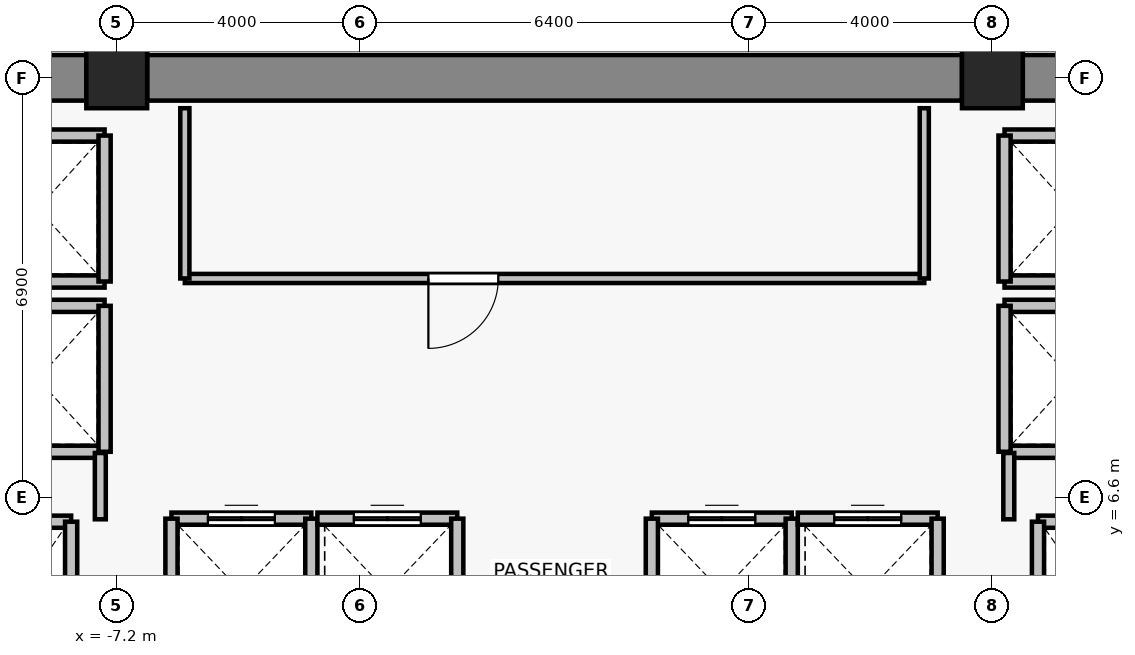
"""IFC4 building model, lengths in metres.
Left out: names, types, materials, properties, quantities, classifications, styles, units other than length and angle.
Written with IfcOpenShell. Run it as: python <this file> out.ifc"""

import sys

from ifc_helpers import new_model, si_unit, direction, frame, frame_2d, origin, origin_2d, place, context, subcontext, project, spatial, rectangle, extrude, source, transform, mapped, element, fill, save


model = new_model("IFC4")
c1 = context("Model", 3, precision=1e-05, world=origin(), true_north=direction((0.0, 1.0)))
c2 = subcontext(c1, "Body", "Model", "MODEL_VIEW")
j1 = project(units=[si_unit("LENGTHUNIT", "METRE"), si_unit("PLANEANGLEUNIT", "RADIAN")], contexts=[c1])
p1 = place(None, origin())
s1 = spatial("IfcSite", under=j1, at=p1, CompositionType="ELEMENT")
p2 = place(p1, origin())
s2 = spatial("IfcBuilding", under=s1, at=p2, CompositionType="ELEMENT")
p3 = place(p2, frame((0.0, 0.0, 149.5)))
s3 = spatial("IfcBuildingStorey", under=s2, at=p3, CompositionType="ELEMENT", Elevation=149.5)
for number, where, z_axis, x_axis in (
    (1, (-7.2, 13.5, 0.0), (0.0, 0.0, 1.0), (1.0, 0.0, 0.0)),
    (2, (7.2, 13.5, 0.0), (0.0, 0.0, 1.0), (1.0, 0.0, 0.0)),
):
    element("IfcColumn", number, at=place(p3, frame(where, z_axis=z_axis, x_axis=x_axis)), inside=s3, PredefinedType="COLUMN", context=c2, shape_type="SweptSolid", body=[
        extrude(rectangle(XDim=1.0, YDim=1.0, at=origin_2d()), origin(), (0.0, 0.0, 1.0), 3.3),
    ])
p4 = place(p3, frame((-13.9, 13.5, 0.0), z_axis=(0.0, 0.0, 1.0), x_axis=(1.0, 0.0, 0.0)))
e3 = element("IfcWall", 3, at=p4, inside=s3, PredefinedType="SHEAR", context=c2, shape_type="SweptSolid", body=[
    extrude(rectangle(XDim=6.2, YDim=0.75, at=frame_2d((3.1, 0.0))), origin(), (0.0, 0.0, 1.0), 3.075),
])
p5 = place(p3, frame((-6.7, 13.5, 0.0), z_axis=(0.0, 0.0, 1.0), x_axis=(1.0, 0.0, 0.0)))
e4 = element("IfcWall", 4, at=p5, inside=s3, PredefinedType="SHEAR", context=c2, shape_type="SweptSolid", body=[
    extrude(rectangle(XDim=13.4, YDim=0.75, at=frame_2d((6.7, 0.0))), origin(), (0.0, 0.0, 1.0), 3.075),
])
p6 = place(p3, frame((7.7, 13.5, 0.0), z_axis=(0.0, 0.0, 1.0), x_axis=(1.0, 0.0, 0.0)))
e5 = element("IfcWall", 5, at=p6, inside=s3, PredefinedType="SHEAR", context=c2, shape_type="SweptSolid", body=[
    extrude(rectangle(XDim=6.2, YDim=0.75, at=frame_2d((3.1, 0.0))), origin(), (0.0, 0.0, 1.0), 3.075),
])
p7 = place(p3, frame((-9.95, 6.2, 0.0), z_axis=(0.0, 0.0, 1.0), x_axis=(1.0, 0.0, 0.0)))
e6 = element("IfcWall", 6, at=p7, inside=s3, PredefinedType="SOLIDWALL", context=c2, shape_type="SweptSolid", body=[
    extrude(rectangle(XDim=2.0, YDim=0.2, at=frame_2d((1.0, 0.0))), origin(), (0.0, 0.0, 1.0), 3.075),
])
p8 = place(p3, frame((-7.95, 6.2, 0.0), z_axis=(0.0, 0.0, 1.0), x_axis=(0.0, -1.0, 0.0)))
e7 = element("IfcWall", 7, at=p8, inside=s3, PredefinedType="SOLIDWALL", context=c2, shape_type="SweptSolid", body=[
    extrude(rectangle(XDim=2.8, YDim=0.2, at=frame_2d((1.4, 0.0))), origin(), (0.0, 0.0, 1.0), 3.075),
])
p9 = place(p3, frame((7.95, 6.2, 0.0), z_axis=(0.0, 0.0, 1.0), x_axis=(1.0, 0.0, 0.0)))
e8 = element("IfcWall", 8, at=p9, inside=s3, PredefinedType="SOLIDWALL", context=c2, shape_type="SweptSolid", body=[
    extrude(rectangle(XDim=2.0, YDim=0.2, at=frame_2d((1.0, 0.0))), origin(), (0.0, 0.0, 1.0), 3.075),
])
p10 = place(p3, frame((7.95, 3.4, 0.0), z_axis=(0.0, 0.0, 1.0), x_axis=(0.0, 1.0, 0.0)))
e9 = element("IfcWall", 9, at=p10, inside=s3, PredefinedType="SOLIDWALL", context=c2, shape_type="SweptSolid", body=[
    extrude(rectangle(XDim=2.8, YDim=0.2, at=frame_2d((1.4, 0.0))), origin(), (0.0, 0.0, 1.0), 3.075),
])
p11 = place(p3, frame((-6.3, 6.25, 0.0), z_axis=(0.0, 0.0, 1.0), x_axis=(1.0, 0.0, 0.0)))
e10 = element("IfcWall", 10, at=p11, inside=s3, PredefinedType="SOLIDWALL", context=c2, shape_type="SweptSolid", body=[
    extrude(rectangle(XDim=2.3, YDim=0.2, at=frame_2d((1.15, 0.0))), origin(), (0.0, 0.0, 1.0), 3.075),
])
p12 = place(p11, frame((0.6, 0.0, 0.0)))
e11 = element("IfcOpeningElement", 11, at=p12, cuts=e10, PredefinedType="OPENING", context=c2, shape_type="SweptSolid", body=[
    extrude(rectangle(XDim=1.1, YDim=2.2, at=frame_2d((0.55, 1.1))), frame((0.0, 0.11, 0.0), z_axis=(0.0, -1.0, 0.0), x_axis=(1.0, 0.0, 0.0)), (0.0, 0.0, 1.0), 0.22),
])
for number, where, z_axis, x_axis in (
    (12, (-6.3, 3.85, 0.0), (0.0, 0.0, 1.0), (0.0, 1.0, 0.0)),
    (13, (-4.0, 6.25, 0.0), (0.0, 0.0, 1.0), (0.0, -1.0, 0.0)),
):
    element("IfcWall", number, at=place(p3, frame(where, z_axis=z_axis, x_axis=x_axis)), inside=s3, PredefinedType="SOLIDWALL", context=c2, shape_type="SweptSolid", body=[
        extrude(rectangle(XDim=2.4, YDim=0.2, at=frame_2d((1.2, 0.0))), origin(), (0.0, 0.0, 1.0), 3.075),
    ])
p13 = place(p3, frame((-3.9, 6.25, 0.0), z_axis=(0.0, 0.0, 1.0), x_axis=(1.0, 0.0, 0.0)))
e14 = element("IfcWall", 14, at=p13, inside=s3, PredefinedType="SOLIDWALL", context=c2, shape_type="SweptSolid", body=[
    extrude(rectangle(XDim=2.3, YDim=0.2, at=frame_2d((1.15, 0.0))), origin(), (0.0, 0.0, 1.0), 3.075),
])
p14 = place(p13, frame((0.6, 0.0, 0.0)))
e15 = element("IfcOpeningElement", 15, at=p14, cuts=e14, PredefinedType="OPENING", context=c2, shape_type="SweptSolid", body=[
    extrude(rectangle(XDim=1.1, YDim=2.2, at=frame_2d((0.55, 1.1))), frame((0.0, 0.11, 0.0), z_axis=(0.0, -1.0, 0.0), x_axis=(1.0, 0.0, 0.0)), (0.0, 0.0, 1.0), 0.22),
])
p15 = place(p3, frame((-1.6, 6.25, 0.0), z_axis=(0.0, 0.0, 1.0), x_axis=(0.0, -1.0, 0.0)))
e16 = element("IfcWall", 16, at=p15, inside=s3, PredefinedType="SOLIDWALL", context=c2, shape_type="SweptSolid", body=[
    extrude(rectangle(XDim=2.4, YDim=0.2, at=frame_2d((1.2, 0.0))), origin(), (0.0, 0.0, 1.0), 3.075),
])
p16 = place(p3, frame((1.6, 6.25, 0.0), z_axis=(0.0, 0.0, 1.0), x_axis=(1.0, 0.0, 0.0)))
e17 = element("IfcWall", 17, at=p16, inside=s3, PredefinedType="SOLIDWALL", context=c2, shape_type="SweptSolid", body=[
    extrude(rectangle(XDim=2.3, YDim=0.2, at=frame_2d((1.15, 0.0))), origin(), (0.0, 0.0, 1.0), 3.075),
])
p17 = place(p16, frame((0.6, 0.0, 0.0)))
e18 = element("IfcOpeningElement", 18, at=p17, cuts=e17, PredefinedType="OPENING", context=c2, shape_type="SweptSolid", body=[
    extrude(rectangle(XDim=1.1, YDim=2.2, at=frame_2d((0.55, 1.1))), frame((0.0, 0.11, 0.0), z_axis=(0.0, -1.0, 0.0), x_axis=(1.0, 0.0, 0.0)), (0.0, 0.0, 1.0), 0.22),
])
for number, where, z_axis, x_axis in (
    (19, (1.6, 3.85, 0.0), (0.0, 0.0, 1.0), (0.0, 1.0, 0.0)),
    (20, (3.9, 6.25, 0.0), (0.0, 0.0, 1.0), (0.0, -1.0, 0.0)),
):
    element("IfcWall", number, at=place(p3, frame(where, z_axis=z_axis, x_axis=x_axis)), inside=s3, PredefinedType="SOLIDWALL", context=c2, shape_type="SweptSolid", body=[
        extrude(rectangle(XDim=2.4, YDim=0.2, at=frame_2d((1.2, 0.0))), origin(), (0.0, 0.0, 1.0), 3.075),
    ])
p18 = place(p3, frame((4.0, 6.25, 0.0), z_axis=(0.0, 0.0, 1.0), x_axis=(1.0, 0.0, 0.0)))
e21 = element("IfcWall", 21, at=p18, inside=s3, PredefinedType="SOLIDWALL", context=c2, shape_type="SweptSolid", body=[
    extrude(rectangle(XDim=2.3, YDim=0.2, at=frame_2d((1.15, 0.0))), origin(), (0.0, 0.0, 1.0), 3.075),
])
p19 = place(p18, frame((0.6, 0.0, 0.0)))
e22 = element("IfcOpeningElement", 22, at=p19, cuts=e21, PredefinedType="OPENING", context=c2, shape_type="SweptSolid", body=[
    extrude(rectangle(XDim=1.1, YDim=2.2, at=frame_2d((0.55, 1.1))), frame((0.0, 0.11, 0.0), z_axis=(0.0, -1.0, 0.0), x_axis=(1.0, 0.0, 0.0)), (0.0, 0.0, 1.0), 0.22),
])
p20 = place(p3, frame((6.3, 6.25, 0.0), z_axis=(0.0, 0.0, 1.0), x_axis=(0.0, -1.0, 0.0)))
e23 = element("IfcWall", 23, at=p20, inside=s3, PredefinedType="SOLIDWALL", context=c2, shape_type="SweptSolid", body=[
    extrude(rectangle(XDim=2.4, YDim=0.2, at=frame_2d((1.2, 0.0))), origin(), (0.0, 0.0, 1.0), 3.075),
])
for number, where, z_axis, x_axis in (
    (24, (-7.4, 7.35, 0.0), (0.0, 0.0, 1.0), (-1.0, 0.0, 0.0)),
    (25, (-9.6, 9.75, 0.0), (0.0, 0.0, 1.0), (1.0, 0.0, 0.0)),
):
    element("IfcWall", number, at=place(p3, frame(where, z_axis=z_axis, x_axis=x_axis)), inside=s3, PredefinedType="SOLIDWALL", context=c2, shape_type="SweptSolid", body=[
        extrude(rectangle(XDim=2.2, YDim=0.2, at=frame_2d((1.1, 0.0))), origin(), (0.0, 0.0, 1.0), 2.565),
    ])
p21 = place(p3, frame((-7.4, 9.75, 0.0), z_axis=(0.0, 0.0, 1.0), x_axis=(0.0, -1.0, 0.0)))
e26 = element("IfcWall", 26, at=p21, inside=s3, PredefinedType="SOLIDWALL", context=c2, shape_type="SweptSolid", body=[
    extrude(rectangle(XDim=2.4, YDim=0.2, at=frame_2d((1.2, 0.0))), origin(), (0.0, 0.0, 1.0), 2.565),
])
for number, where, z_axis, x_axis in (
    (27, (-7.4, 10.15, 0.0), (0.0, 0.0, 1.0), (-1.0, 0.0, 0.0)),
    (28, (-9.6, 12.55, 0.0), (0.0, 0.0, 1.0), (1.0, 0.0, 0.0)),
):
    element("IfcWall", number, at=place(p3, frame(where, z_axis=z_axis, x_axis=x_axis)), inside=s3, PredefinedType="SOLIDWALL", context=c2, shape_type="SweptSolid", body=[
        extrude(rectangle(XDim=2.2, YDim=0.2, at=frame_2d((1.1, 0.0))), origin(), (0.0, 0.0, 1.0), 2.565),
    ])
p22 = place(p3, frame((-7.4, 12.55, 0.0), z_axis=(0.0, 0.0, 1.0), x_axis=(0.0, -1.0, 0.0)))
e29 = element("IfcWall", 29, at=p22, inside=s3, PredefinedType="SOLIDWALL", context=c2, shape_type="SweptSolid", body=[
    extrude(rectangle(XDim=2.4, YDim=0.2, at=frame_2d((1.2, 0.0))), origin(), (0.0, 0.0, 1.0), 2.565),
])
for number, where, z_axis, x_axis in (
    (30, (9.6, 7.35, 0.0), (0.0, 0.0, 1.0), (-1.0, 0.0, 0.0)),
    (31, (7.4, 9.75, 0.0), (0.0, 0.0, 1.0), (1.0, 0.0, 0.0)),
):
    element("IfcWall", number, at=place(p3, frame(where, z_axis=z_axis, x_axis=x_axis)), inside=s3, PredefinedType="SOLIDWALL", context=c2, shape_type="SweptSolid", body=[
        extrude(rectangle(XDim=2.2, YDim=0.2, at=frame_2d((1.1, 0.0))), origin(), (0.0, 0.0, 1.0), 2.565),
    ])
p23 = place(p3, frame((7.4, 7.35, 0.0), z_axis=(0.0, 0.0, 1.0), x_axis=(0.0, 1.0, 0.0)))
e32 = element("IfcWall", 32, at=p23, inside=s3, PredefinedType="SOLIDWALL", context=c2, shape_type="SweptSolid", body=[
    extrude(rectangle(XDim=2.4, YDim=0.2, at=frame_2d((1.2, 0.0))), origin(), (0.0, 0.0, 1.0), 2.565),
])
for number, where, z_axis, x_axis in (
    (33, (9.6, 10.15, 0.0), (0.0, 0.0, 1.0), (-1.0, 0.0, 0.0)),
    (34, (7.4, 12.55, 0.0), (0.0, 0.0, 1.0), (1.0, 0.0, 0.0)),
):
    element("IfcWall", number, at=place(p3, frame(where, z_axis=z_axis, x_axis=x_axis)), inside=s3, PredefinedType="SOLIDWALL", context=c2, shape_type="SweptSolid", body=[
        extrude(rectangle(XDim=2.2, YDim=0.2, at=frame_2d((1.1, 0.0))), origin(), (0.0, 0.0, 1.0), 2.565),
    ])
p24 = place(p3, frame((7.4, 10.15, 0.0), z_axis=(0.0, 0.0, 1.0), x_axis=(0.0, 1.0, 0.0)))
e35 = element("IfcWall", 35, at=p24, inside=s3, PredefinedType="SOLIDWALL", context=c2, shape_type="SweptSolid", body=[
    extrude(rectangle(XDim=2.4, YDim=0.2, at=frame_2d((1.2, 0.0))), origin(), (0.0, 0.0, 1.0), 2.565),
])
for number, where, z_axis, x_axis in (
    (36, (-7.47, 7.33, 0.0), (0.0, 0.0, 1.0), (0.0, -1.0, 0.0)),
    (37, (7.47, 6.24, 0.0), (0.0, 0.0, 1.0), (0.0, 1.0, 0.0)),
):
    element("IfcWall", number, at=place(p3, frame(where, z_axis=z_axis, x_axis=x_axis)), inside=s3, PredefinedType="PARTITIONING", context=c2, shape_type="SweptSolid", body=[
        extrude(rectangle(XDim=1.09, YDim=0.18, at=frame_2d((0.545, 0.0))), origin(), (0.0, 0.0, 1.0), 2.565),
    ])
p25 = place(p3, frame((6.08, 10.2, 0.0), z_axis=(0.0, 0.0, 1.0), x_axis=(-1.0, 0.0, 0.0)))
e38 = element("IfcWall", 38, at=p25, inside=s3, PredefinedType="PARTITIONING", context=c2, shape_type="SweptSolid", body=[
    extrude(rectangle(XDim=12.16, YDim=0.15, at=frame_2d((6.08, 0.0))), origin(), (0.0, 0.0, 1.0), 3.075),
])
p26 = place(p25, frame((7.005, 0.0, 0.0)))
e39 = element("IfcOpeningElement", 39, at=p26, cuts=e38, PredefinedType="OPENING", context=c2, shape_type="SweptSolid", body=[
    extrude(rectangle(XDim=1.15, YDim=2.15, at=frame_2d((0.575, 1.075))), frame((0.0, 0.085, 0.0), z_axis=(0.0, -1.0, 0.0), x_axis=(1.0, 0.0, 0.0)), (0.0, 0.0, 1.0), 0.17),
])
for number, where, z_axis, x_axis in (
    (40, (-6.08, 10.2, 0.0), (0.0, 0.0, 1.0), (0.0, 1.0, 0.0)),
    (41, (6.08, 13.0, 0.0), (0.0, 0.0, 1.0), (0.0, -1.0, 0.0)),
):
    element("IfcWall", number, at=place(p3, frame(where, z_axis=z_axis, x_axis=x_axis)), inside=s3, PredefinedType="PARTITIONING", context=c2, shape_type="SweptSolid", body=[
        extrude(rectangle(XDim=2.8, YDim=0.15, at=frame_2d((1.4, 0.0))), origin(), (0.0, 0.0, 1.0), 3.075),
    ])
m1 = source(origin(), c2, "Body", "SweptSolid", [
    extrude(rectangle(XDim=1.1, YDim=2.2, at=frame_2d((0.55, 1.1))), frame((0.0, 0.025, 0.0), z_axis=(0.0, -1.0, 0.0), x_axis=(1.0, 0.0, 0.0)), (0.0, 0.0, 1.0), 0.05),
])
p27 = place(p12, origin())
e42 = element("IfcDoor", 42, at=p27, inside=s3, OperationType="DOUBLE_DOOR_SLIDING", PredefinedType="DOOR", context=c2, shape_type="MappedRepresentation", body=[
    mapped(m1, transform((0.0, 0.0, 0.0), x_axis=(1.0, 0.0, 0.0), y_axis=(0.0, 1.0, 0.0), z_axis=(0.0, 0.0, 1.0), scale=1.0)),
])
fill(e11, e42)
p28 = place(p14, origin())
e43 = element("IfcDoor", 43, at=p28, inside=s3, OperationType="DOUBLE_DOOR_SLIDING", PredefinedType="DOOR", context=c2, shape_type="MappedRepresentation", body=[
    mapped(m1, transform((0.0, 0.0, 0.0), x_axis=(1.0, 0.0, 0.0), y_axis=(0.0, 1.0, 0.0), z_axis=(0.0, 0.0, 1.0), scale=1.0)),
])
fill(e15, e43)
p29 = place(p17, origin())
e44 = element("IfcDoor", 44, at=p29, inside=s3, OperationType="DOUBLE_DOOR_SLIDING", PredefinedType="DOOR", context=c2, shape_type="MappedRepresentation", body=[
    mapped(m1, transform((0.0, 0.0, 0.0), x_axis=(1.0, 0.0, 0.0), y_axis=(0.0, 1.0, 0.0), z_axis=(0.0, 0.0, 1.0), scale=1.0)),
])
fill(e18, e44)
p30 = place(p19, origin())
e45 = element("IfcDoor", 45, at=p30, inside=s3, OperationType="DOUBLE_DOOR_SLIDING", PredefinedType="DOOR", context=c2, shape_type="MappedRepresentation", body=[
    mapped(m1, transform((0.0, 0.0, 0.0), x_axis=(1.0, 0.0, 0.0), y_axis=(0.0, 1.0, 0.0), z_axis=(0.0, 0.0, 1.0), scale=1.0)),
])
fill(e22, e45)
m2 = source(origin(), c2, "Body", "SweptSolid", [
    extrude(rectangle(XDim=1.15, YDim=2.15, at=frame_2d((0.575, 1.075))), frame((0.0, 0.025, 0.0), z_axis=(0.0, -1.0, 0.0), x_axis=(1.0, 0.0, 0.0)), (0.0, 0.0, 1.0), 0.05),
])
p31 = place(p26, origin())
e46 = element("IfcDoor", 46, at=p31, inside=s3, OperationType="SINGLE_SWING_RIGHT", PredefinedType="DOOR", context=c2, shape_type="MappedRepresentation", body=[
    mapped(m2, transform((0.0, 0.0, 0.0), x_axis=(1.0, 0.0, 0.0), y_axis=(0.0, 1.0, 0.0), z_axis=(0.0, 0.0, 1.0), scale=1.0)),
])
fill(e39, e46)
save(model, sys.argv[1])
